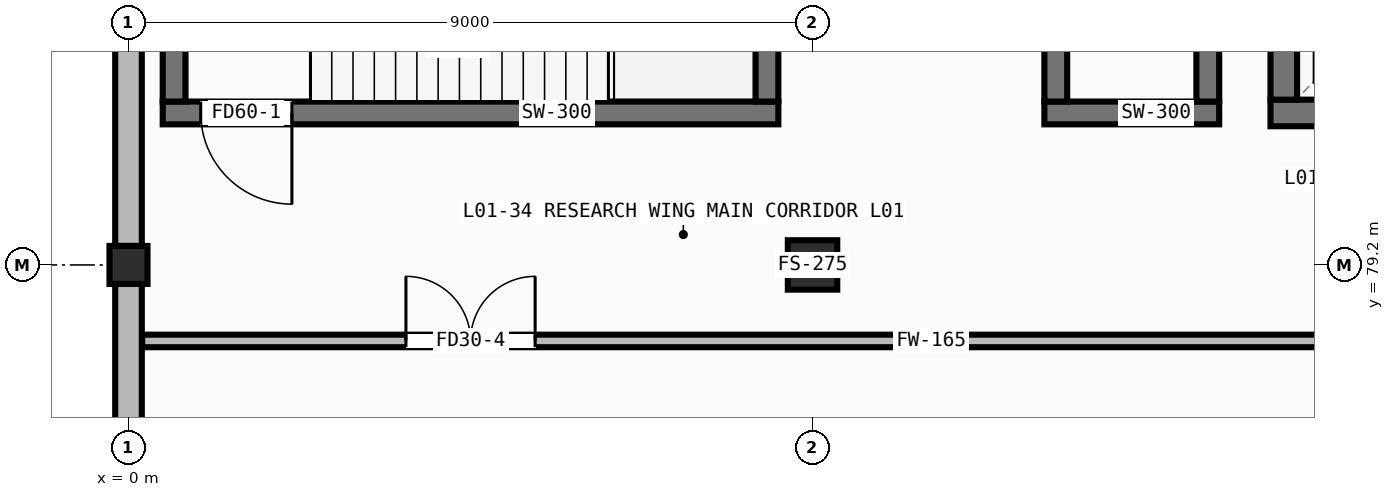
"""IFC4 building model, lengths in metres.
Left out: names, types, materials, properties, quantities, classifications, styles, units other than length and angle.
Written with IfcOpenShell. Run it as: python <this file> out.ifc"""

import sys

from ifc_helpers import new_model, si_unit, direction, frame, frame_2d, origin, origin_2d, place, context, subcontext, project, spatial, rectangle, hollow_rectangle, extrude, element, fill, save


model = new_model("IFC4")
c1 = context("Model", 3, precision=1e-05, world=origin(), true_north=direction((0.0, 1.0)))
c2 = subcontext(c1, "Body", "Model", "MODEL_VIEW")
j1 = project(units=[si_unit("LENGTHUNIT", "METRE"), si_unit("PLANEANGLEUNIT", "RADIAN")], contexts=[c1])
p1 = place(None, origin())
s1 = spatial("IfcSite", under=j1, at=p1, CompositionType="ELEMENT")
p2 = place(p1, origin())
s2 = spatial("IfcBuilding", under=s1, at=p2, CompositionType="ELEMENT")
p3 = place(p2, origin())
s3 = spatial("IfcBuildingStorey", under=s2, at=p3, CompositionType="ELEMENT", Elevation=0.0)
p4 = place(p3, frame((0.0, 79.2, 0.0), z_axis=(0.0, 0.0, 1.0), x_axis=(1.0, 0.0, 0.0)))
e1 = element("IfcColumn", 1, at=p4, inside=s3, PredefinedType="COLUMN", context=c2, shape_type="SweptSolid", body=[
    extrude(hollow_rectangle(XDim=0.5, YDim=0.5, WallThickness=0.022, at=origin_2d()), origin(), (0.0, 0.0, 1.0), 4.8),
])
p5 = place(p3, frame((9.0, 79.2, 0.0), z_axis=(0.0, 0.0, 1.0), x_axis=(1.0, 0.0, 0.0)))
e2 = element("IfcColumn", 2, at=p5, inside=s3, PredefinedType="COLUMN", context=c2, shape_type="SweptSolid", body=[
    extrude(hollow_rectangle(XDim=0.65, YDim=0.65, WallThickness=0.025, at=origin_2d()), origin(), (0.0, 0.0, 1.0), 4.8),
])
p6 = place(p3, frame((0.0, 72.25, 0.0), z_axis=(0.0, 0.0, 1.0), x_axis=(0.0, 1.0, 0.0)))
e3 = element("IfcWall", 3, at=p6, inside=s3, PredefinedType="STANDARD", context=c2, shape_type="SweptSolid", body=[
    extrude(rectangle(XDim=6.7, YDim=0.35, at=frame_2d((3.35, 0.0))), origin(), (0.0, 0.0, 1.0), 4.055),
])
p7 = place(p6, frame((2.05, 0.0, 0.85)))
e4 = element("IfcOpeningElement", 4, at=p7, cuts=e3, PredefinedType="OPENING", context=c2, shape_type="SweptSolid", body=[
    extrude(rectangle(XDim=2.6, YDim=1.6, at=frame_2d((1.3, 0.8))), frame((0.0, 0.187, 0.0), z_axis=(0.0, -1.0, 0.0), x_axis=(1.0, 0.0, 0.0)), (0.0, 0.0, 1.0), 0.374),
])
p8 = place(p3, frame((0.0, 79.45, 0.0), z_axis=(0.0, 0.0, 1.0), x_axis=(0.0, 1.0, 0.0)))
e5 = element("IfcWall", 5, at=p8, inside=s3, PredefinedType="STANDARD", context=c2, shape_type="SweptSolid", body=[
    extrude(rectangle(XDim=6.7, YDim=0.35, at=frame_2d((3.35, 0.0))), origin(), (0.0, 0.0, 1.0), 4.055),
])
p9 = place(p3, frame((0.45, 81.2, 0.0), z_axis=(0.0, 0.0, 1.0), x_axis=(1.0, 0.0, 0.0)))
e6 = element("IfcWall", 6, at=p9, inside=s3, PredefinedType="SHEAR", context=c2, shape_type="SweptSolid", body=[
    extrude(rectangle(XDim=8.1, YDim=0.3, at=frame_2d((4.05, 0.0))), origin(), (0.0, 0.0, 1.0), 4.555),
])
p10 = place(p9, frame((0.5, 0.0, 0.0)))
e7 = element("IfcOpeningElement", 7, at=p10, cuts=e6, PredefinedType="OPENING", context=c2, shape_type="SweptSolid", body=[
    extrude(rectangle(XDim=1.2, YDim=2.1, at=frame_2d((0.6, 1.05))), frame((0.0, 0.162, 0.0), z_axis=(0.0, -1.0, 0.0), x_axis=(1.0, 0.0, 0.0)), (0.0, 0.0, 1.0), 0.324),
])
for number, where, z_axis, x_axis in (
    (8, (0.6, 81.35, 0.0), (0.0, 0.0, 1.0), (0.0, 1.0, 0.0)),
    (9, (8.4, 81.35, 0.0), (0.0, 0.0, 1.0), (0.0, 1.0, 0.0)),
):
    element("IfcWall", number, at=place(p3, frame(where, z_axis=z_axis, x_axis=x_axis)), inside=s3, PredefinedType="SHEAR", context=c2, shape_type="SweptSolid", body=[
        extrude(rectangle(XDim=3.8, YDim=0.3, at=frame_2d((1.9, 0.0))), origin(), (0.0, 0.0, 1.0), 4.555),
    ])
p11 = place(p3, frame((15.025, 81.2, 0.0), z_axis=(0.0, 0.0, 1.0), x_axis=(1.0, 0.0, 0.0)))
e10 = element("IfcWall", 10, at=p11, inside=s3, PredefinedType="SHEAR", context=c2, shape_type="SweptSolid", body=[
    extrude(rectangle(XDim=2.75, YDim=0.35, at=frame_2d((1.375, 0.0))), origin(), (0.0, 0.0, 1.0), 4.555),
])
p12 = place(p11, frame((0.825, 0.0, 0.0)))
e11 = element("IfcOpeningElement", 11, at=p12, cuts=e10, PredefinedType="OPENING", context=c2, shape_type="SweptSolid", body=[
    extrude(rectangle(XDim=1.1, YDim=2.1, at=frame_2d((0.55, 1.05))), frame((0.0, 0.187, 0.0), z_axis=(0.0, -1.0, 0.0), x_axis=(1.0, 0.0, 0.0)), (0.0, 0.0, 1.0), 0.374),
])
p13 = place(p3, frame((15.2, 81.375, 0.0), z_axis=(0.0, 0.0, 1.0), x_axis=(0.0, 1.0, 0.0)))
e12 = element("IfcWall", 12, at=p13, inside=s3, PredefinedType="SHEAR", context=c2, shape_type="SweptSolid", body=[
    extrude(rectangle(XDim=2.25, YDim=0.35, at=frame_2d((1.125, 0.0))), origin(), (0.0, 0.0, 1.0), 4.555),
])
p14 = place(p3, frame((12.05, 81.2, 0.0), z_axis=(0.0, 0.0, 1.0), x_axis=(1.0, 0.0, 0.0)))
e13 = element("IfcWall", 13, at=p14, inside=s3, PredefinedType="SHEAR", context=c2, shape_type="SweptSolid", body=[
    extrude(rectangle(XDim=2.3, YDim=0.3, at=frame_2d((1.15, 0.0))), origin(), (0.0, 0.0, 1.0), 4.555),
])
for number, where, z_axis, x_axis in (
    (14, (12.2, 81.35, 0.0), (0.0, 0.0, 1.0), (0.0, 1.0, 0.0)),
    (15, (14.2, 81.35, 0.0), (0.0, 0.0, 1.0), (0.0, 1.0, 0.0)),
):
    element("IfcWall", number, at=place(p3, frame(where, z_axis=z_axis, x_axis=x_axis)), inside=s3, PredefinedType="SHEAR", context=c2, shape_type="SweptSolid", body=[
        extrude(rectangle(XDim=1.9, YDim=0.3, at=frame_2d((0.95, 0.0))), origin(), (0.0, 0.0, 1.0), 4.555),
    ])
p15 = place(p3, frame((0.18, 78.2, 0.0), z_axis=(0.0, 0.0, 1.0), x_axis=(1.0, 0.0, 0.0)))
e16 = element("IfcWall", 16, at=p15, inside=s3, PredefinedType="PARTITIONING", context=c2, shape_type="SweptSolid", body=[
    extrude(rectangle(XDim=16.22, YDim=0.165, at=frame_2d((8.11, 0.0))), origin(), (0.0, 0.0, 1.0), 4.555),
])
p16 = place(p15, frame((3.47, 0.0, 0.0)))
e17 = element("IfcOpeningElement", 17, at=p16, cuts=e16, PredefinedType="OPENING", context=c2, shape_type="SweptSolid", body=[
    extrude(rectangle(XDim=1.7, YDim=2.12, at=frame_2d((0.85, 1.06))), frame((0.0, 0.094, 0.0), z_axis=(0.0, -1.0, 0.0), x_axis=(1.0, 0.0, 0.0)), (0.0, 0.0, 1.0), 0.189),
])
p17 = place(p10, frame((1.2, 0.0, 0.0), z_axis=(0.0, 0.0, 1.0), x_axis=(-1.0, 0.0, 0.0)))
e18 = element("IfcDoor", 18, at=p17, inside=s3, OperationType="SINGLE_SWING_LEFT", PredefinedType="DOOR", context=c2, shape_type="SweptSolid", body=[
    extrude(rectangle(XDim=1.2, YDim=2.1, at=frame_2d((0.6, 1.05))), frame((0.0, 0.025, 0.0), z_axis=(0.0, -1.0, 0.0), x_axis=(1.0, 0.0, 0.0)), (0.0, 0.0, 1.0), 0.05),
])
fill(e7, e18)
p18 = place(p16, origin())
e19 = element("IfcDoor", 19, at=p18, inside=s3, OperationType="DOUBLE_DOOR_SINGLE_SWING", PredefinedType="DOOR", context=c2, shape_type="SweptSolid", body=[
    extrude(rectangle(XDim=1.7, YDim=2.12, at=frame_2d((0.85, 1.06))), frame((0.0, 0.025, 0.0), z_axis=(0.0, -1.0, 0.0), x_axis=(1.0, 0.0, 0.0)), (0.0, 0.0, 1.0), 0.05),
])
fill(e17, e19)
save(model, sys.argv[1])
